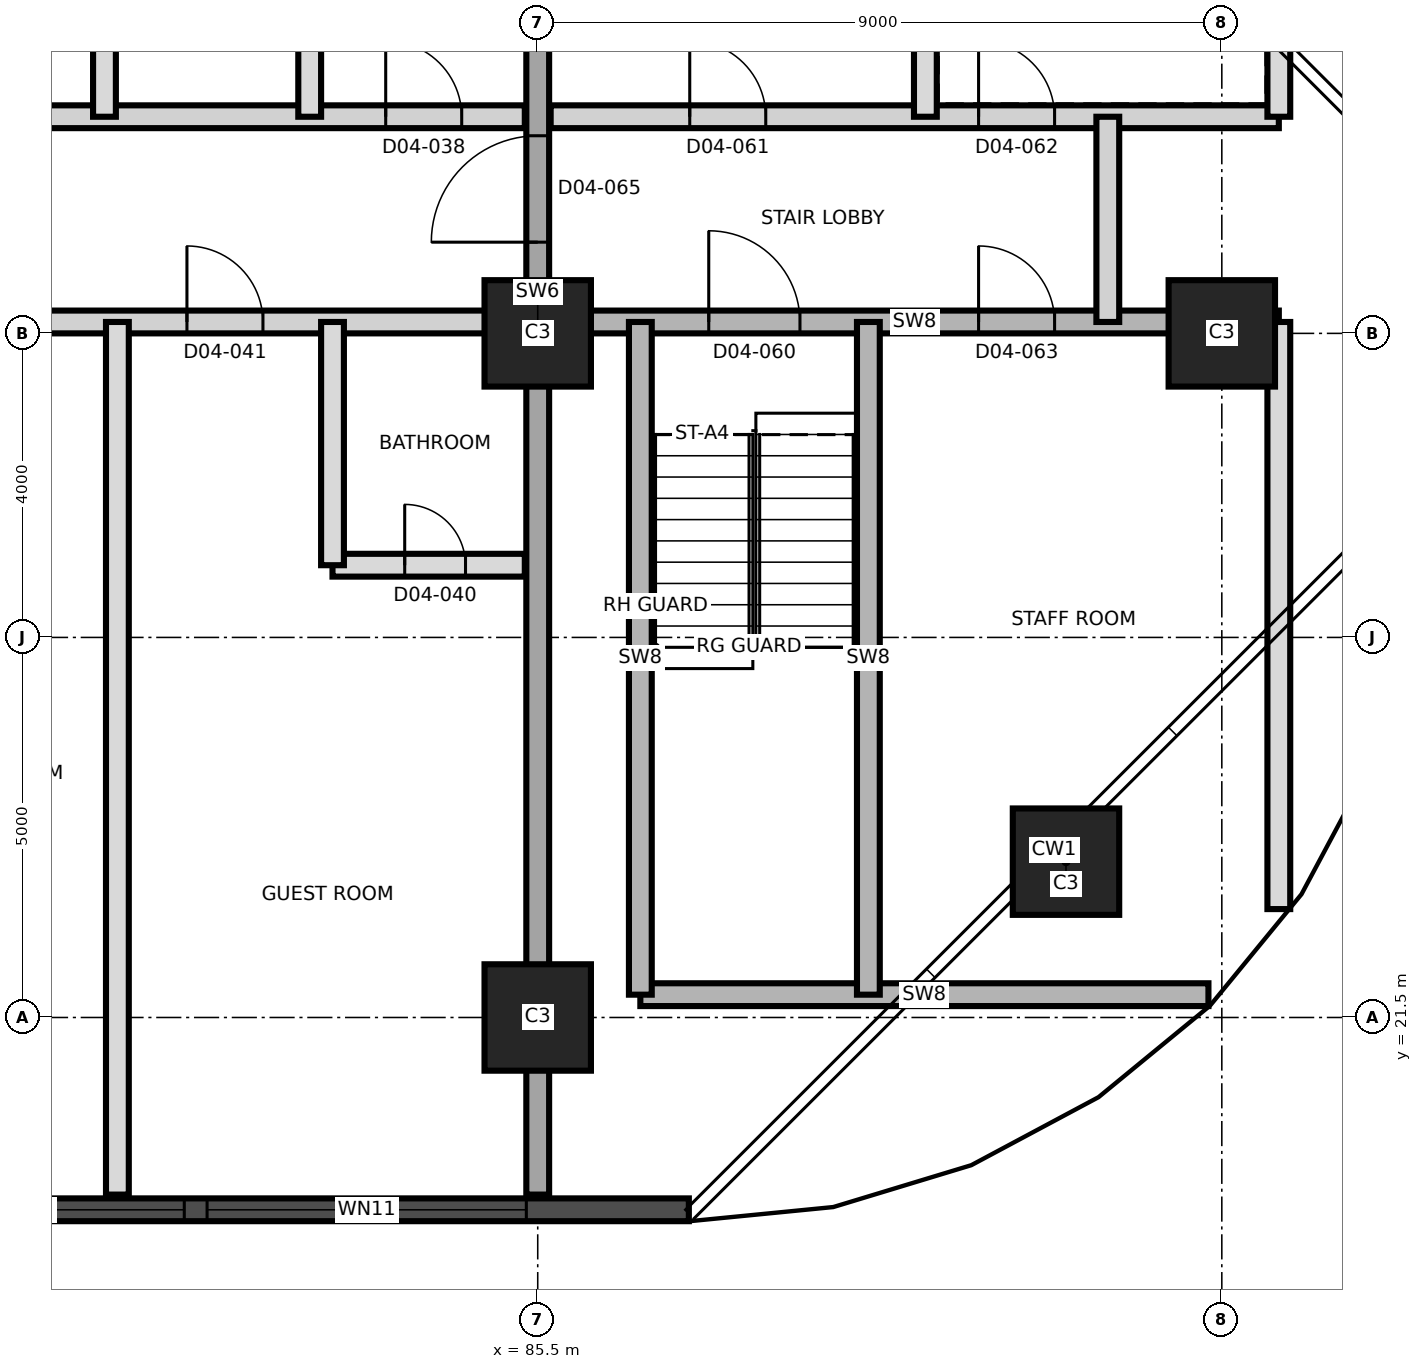
"""IFC4 building model, lengths in metres.
Left out: names, types, materials, properties, quantities, classifications, styles, units other than length and angle.
Written with IfcOpenShell. Run it as: python <this file> out.ifc"""

import sys

from ifc_helpers import new_model, si_unit, direction, frame, frame_2d, origin, origin_2d, place, context, subcontext, project, spatial, rectangle, extrude, element, fill, save


model = new_model("IFC4")
c1 = context("Model", 3, precision=1e-05, world=origin(), true_north=direction((0.0, 1.0)))
c2 = subcontext(c1, "Body", "Model", "MODEL_VIEW")
j1 = project(units=[si_unit("LENGTHUNIT", "METRE"), si_unit("PLANEANGLEUNIT", "RADIAN")], contexts=[c1])
p1 = place(None, origin())
s1 = spatial("IfcSite", under=j1, at=p1, CompositionType="ELEMENT")
p2 = place(p1, origin())
s2 = spatial("IfcBuilding", under=s1, at=p2, CompositionType="ELEMENT")
p3 = place(p2, frame((0.0, 0.0, 63.1)))
s3 = spatial("IfcBuildingStorey", under=s2, at=p3, CompositionType="ELEMENT", Elevation=63.1)
for number, where, z_axis, x_axis in (
    (1, (85.5, 21.5, 0.0), (0.0, 0.0, 1.0), (1.0, 0.0, 0.0)),
    (2, (92.45, 23.55, 0.0), (0.0, 0.0, 1.0), (1.0, 0.0, 0.0)),
    (3, (85.5, 30.5, 0.0), (0.0, 0.0, 1.0), (1.0, 0.0, 0.0)),
    (4, (94.5, 30.5, 0.0), (0.0, 0.0, 1.0), (1.0, 0.0, 0.0)),
):
    element("IfcColumn", number, at=place(p3, frame(where, z_axis=z_axis, x_axis=x_axis)), inside=s3, PredefinedType="COLUMN", context=c2, shape_type="SweptSolid", body=[
        extrude(rectangle(XDim=1.4, YDim=1.4, at=origin_2d()), origin(), (0.0, 0.0, 1.0), 3.7),
    ])
p4 = place(p3, frame((85.5, 19.17, 0.0), z_axis=(0.0, 0.0, 1.0), x_axis=(0.0, 1.0, 0.0)))
e5 = element("IfcWall", 5, at=p4, inside=s3, PredefinedType="SHEAR", context=c2, shape_type="SweptSolid", body=[
    extrude(rectangle(XDim=22.66, YDim=0.3, at=frame_2d((11.33, 0.0))), origin(), (0.0, 0.0, 1.0), 3.7),
])
p5 = place(p4, frame((12.53, 0.0, 0.0)))
e6 = element("IfcOpeningElement", 6, at=p5, cuts=e5, PredefinedType="OPENING", context=c2, shape_type="SweptSolid", body=[
    extrude(rectangle(XDim=1.4, YDim=2.1, at=frame_2d((0.7, 1.05))), frame((0.0, 0.16, 0.0), z_axis=(0.0, -1.0, 0.0), x_axis=(1.0, 0.0, 0.0)), (0.0, 0.0, 1.0), 0.32),
])
p6 = place(p3, frame((44.01, 18.97, 0.0), z_axis=(0.0, 0.0, 1.0), x_axis=(1.0, 0.0, 0.0)))
e7 = element("IfcWall", 7, at=p6, inside=s3, PredefinedType="SOLIDWALL", context=c2, shape_type="SweptSolid", body=[
    extrude(rectangle(XDim=43.478, YDim=0.3, at=frame_2d((21.739, 0.0))), origin(), (0.0, 0.0, 1.0), 3.4),
])
p7 = place(p6, frame((1.845, 0.0, 0.3)))
e8 = element("IfcOpeningElement", 8, at=p7, cuts=e7, PredefinedType="OPENING", context=c2, shape_type="SweptSolid", body=[
    extrude(rectangle(XDim=1.8, YDim=2.4, at=frame_2d((0.9, 1.2))), frame((0.0, 0.16, 0.0), z_axis=(0.0, -1.0, 0.0), x_axis=(1.0, 0.0, 0.0)), (0.0, 0.0, 1.0), 0.32),
])
p8 = place(p6, frame((5.64, 0.0, 0.9)))
e9 = element("IfcOpeningElement", 9, at=p8, cuts=e7, PredefinedType="OPENING", context=c2, shape_type="SweptSolid", body=[
    extrude(rectangle(XDim=4.2, YDim=1.5, at=frame_2d((2.1, 0.75))), frame((0.0, 0.16, 0.0), z_axis=(0.0, -1.0, 0.0), x_axis=(1.0, 0.0, 0.0)), (0.0, 0.0, 1.0), 0.32),
])
p9 = place(p6, frame((10.14, 0.0, 0.9)))
e10 = element("IfcOpeningElement", 10, at=p9, cuts=e7, PredefinedType="OPENING", context=c2, shape_type="SweptSolid", body=[
    extrude(rectangle(XDim=4.2, YDim=1.5, at=frame_2d((2.1, 0.75))), frame((0.0, 0.16, 0.0), z_axis=(0.0, -1.0, 0.0), x_axis=(1.0, 0.0, 0.0)), (0.0, 0.0, 1.0), 0.32),
])
p10 = place(p6, frame((14.64, 0.0, 0.9)))
e11 = element("IfcOpeningElement", 11, at=p10, cuts=e7, PredefinedType="OPENING", context=c2, shape_type="SweptSolid", body=[
    extrude(rectangle(XDim=4.2, YDim=1.5, at=frame_2d((2.1, 0.75))), frame((0.0, 0.16, 0.0), z_axis=(0.0, -1.0, 0.0), x_axis=(1.0, 0.0, 0.0)), (0.0, 0.0, 1.0), 0.32),
])
p11 = place(p6, frame((19.14, 0.0, 0.9)))
e12 = element("IfcOpeningElement", 12, at=p11, cuts=e7, PredefinedType="OPENING", context=c2, shape_type="SweptSolid", body=[
    extrude(rectangle(XDim=4.2, YDim=1.5, at=frame_2d((2.1, 0.75))), frame((0.0, 0.16, 0.0), z_axis=(0.0, -1.0, 0.0), x_axis=(1.0, 0.0, 0.0)), (0.0, 0.0, 1.0), 0.32),
])
p12 = place(p6, frame((23.64, 0.0, 0.9)))
e13 = element("IfcOpeningElement", 13, at=p12, cuts=e7, PredefinedType="OPENING", context=c2, shape_type="SweptSolid", body=[
    extrude(rectangle(XDim=4.2, YDim=1.5, at=frame_2d((2.1, 0.75))), frame((0.0, 0.16, 0.0), z_axis=(0.0, -1.0, 0.0), x_axis=(1.0, 0.0, 0.0)), (0.0, 0.0, 1.0), 0.32),
])
p13 = place(p6, frame((28.14, 0.0, 0.9)))
e14 = element("IfcOpeningElement", 14, at=p13, cuts=e7, PredefinedType="OPENING", context=c2, shape_type="SweptSolid", body=[
    extrude(rectangle(XDim=4.2, YDim=1.5, at=frame_2d((2.1, 0.75))), frame((0.0, 0.16, 0.0), z_axis=(0.0, -1.0, 0.0), x_axis=(1.0, 0.0, 0.0)), (0.0, 0.0, 1.0), 0.32),
])
p14 = place(p6, frame((32.64, 0.0, 0.9)))
e15 = element("IfcOpeningElement", 15, at=p14, cuts=e7, PredefinedType="OPENING", context=c2, shape_type="SweptSolid", body=[
    extrude(rectangle(XDim=4.2, YDim=1.5, at=frame_2d((2.1, 0.75))), frame((0.0, 0.16, 0.0), z_axis=(0.0, -1.0, 0.0), x_axis=(1.0, 0.0, 0.0)), (0.0, 0.0, 1.0), 0.32),
])
p15 = place(p6, frame((37.14, 0.0, 0.9)))
e16 = element("IfcOpeningElement", 16, at=p15, cuts=e7, PredefinedType="OPENING", context=c2, shape_type="SweptSolid", body=[
    extrude(rectangle(XDim=4.2, YDim=1.5, at=frame_2d((2.1, 0.75))), frame((0.0, 0.16, 0.0), z_axis=(0.0, -1.0, 0.0), x_axis=(1.0, 0.0, 0.0)), (0.0, 0.0, 1.0), 0.32),
])
p16 = place(p3, frame((86.85, 21.8, 0.0), z_axis=(0.0, 0.0, 1.0), x_axis=(1.0, 0.0, 0.0)))
e17 = element("IfcWall", 17, at=p16, inside=s3, PredefinedType="SHEAR", context=c2, shape_type="SweptSolid", body=[
    extrude(rectangle(XDim=7.474, YDim=0.3, at=frame_2d((3.737, 0.0))), origin(), (0.0, 0.0, 1.0), 3.4),
])
p17 = place(p3, frame((82.8, 27.45, 0.0), z_axis=(0.0, 0.0, 1.0), x_axis=(1.0, 0.0, 0.0)))
e18 = element("IfcWall", 18, at=p17, inside=s3, PredefinedType="PARTITIONING", context=c2, shape_type="SweptSolid", body=[
    extrude(rectangle(XDim=2.53, YDim=0.3, at=frame_2d((1.265, 0.0))), origin(), (0.0, 0.0, 1.0), 3.4),
])
p18 = place(p17, frame((0.95, 0.0, 0.0)))
e19 = element("IfcOpeningElement", 19, at=p18, cuts=e18, PredefinedType="OPENING", context=c2, shape_type="SweptSolid", body=[
    extrude(rectangle(XDim=0.8, YDim=2.1, at=frame_2d((0.4, 1.05))), frame((0.0, 0.16, 0.0), z_axis=(0.0, -1.0, 0.0), x_axis=(1.0, 0.0, 0.0)), (0.0, 0.0, 1.0), 0.32),
])
p19 = place(p3, frame((58.95, 30.65, 0.0), z_axis=(0.0, 0.0, 1.0), x_axis=(1.0, 0.0, 0.0)))
e20 = element("IfcWall", 20, at=p19, inside=s3, PredefinedType="PARTITIONING", context=c2, shape_type="SweptSolid", body=[
    extrude(rectangle(XDim=26.38, YDim=0.3, at=frame_2d((13.19, 0.0))), origin(), (0.0, 0.0, 1.0), 3.4),
])
p20 = place(p19, frame((1.25, 0.0, 0.0)))
e21 = element("IfcOpeningElement", 21, at=p20, cuts=e20, PredefinedType="OPENING", context=c2, shape_type="SweptSolid", body=[
    extrude(rectangle(XDim=1.2, YDim=2.1, at=frame_2d((0.6, 1.05))), frame((0.0, 0.16, 0.0), z_axis=(0.0, -1.0, 0.0), x_axis=(1.0, 0.0, 0.0)), (0.0, 0.0, 1.0), 0.32),
])
p21 = place(p19, frame((4.5, 0.0, 0.0)))
e22 = element("IfcOpeningElement", 22, at=p21, cuts=e20, PredefinedType="OPENING", context=c2, shape_type="SweptSolid", body=[
    extrude(rectangle(XDim=1.0, YDim=2.1, at=frame_2d((0.5, 1.05))), frame((0.0, 0.16, 0.0), z_axis=(0.0, -1.0, 0.0), x_axis=(1.0, 0.0, 0.0)), (0.0, 0.0, 1.0), 0.32),
])
p22 = place(p19, frame((14.2, 0.0, 0.0)))
e23 = element("IfcOpeningElement", 23, at=p22, cuts=e20, PredefinedType="OPENING", context=c2, shape_type="SweptSolid", body=[
    extrude(rectangle(XDim=1.0, YDim=2.4, at=frame_2d((0.5, 1.2))), frame((0.0, 0.16, 0.0), z_axis=(0.0, -1.0, 0.0), x_axis=(1.0, 0.0, 0.0)), (0.0, 0.0, 1.0), 0.32),
])
p23 = place(p19, frame((18.685, 0.0, 0.0)))
e24 = element("IfcOpeningElement", 24, at=p23, cuts=e20, PredefinedType="OPENING", context=c2, shape_type="SweptSolid", body=[
    extrude(rectangle(XDim=1.2, YDim=2.1, at=frame_2d((0.6, 1.05))), frame((0.0, 0.16, 0.0), z_axis=(0.0, -1.0, 0.0), x_axis=(1.0, 0.0, 0.0)), (0.0, 0.0, 1.0), 0.32),
])
p24 = place(p19, frame((21.935, 0.0, 0.0)))
e25 = element("IfcOpeningElement", 25, at=p24, cuts=e20, PredefinedType="OPENING", context=c2, shape_type="SweptSolid", body=[
    extrude(rectangle(XDim=1.0, YDim=2.1, at=frame_2d((0.5, 1.05))), frame((0.0, 0.16, 0.0), z_axis=(0.0, -1.0, 0.0), x_axis=(1.0, 0.0, 0.0)), (0.0, 0.0, 1.0), 0.32),
])
p25 = place(p3, frame((85.67, 30.65, 0.0), z_axis=(0.0, 0.0, 1.0), x_axis=(1.0, 0.0, 0.0)))
e26 = element("IfcWall", 26, at=p25, inside=s3, PredefinedType="SHEAR", context=c2, shape_type="SweptSolid", body=[
    extrude(rectangle(XDim=9.58, YDim=0.3, at=frame_2d((4.79, 0.0))), origin(), (0.0, 0.0, 1.0), 3.4),
])
p26 = place(p25, frame((2.08, 0.0, 0.0)))
e27 = element("IfcOpeningElement", 27, at=p26, cuts=e26, PredefinedType="OPENING", context=c2, shape_type="SweptSolid", body=[
    extrude(rectangle(XDim=1.2, YDim=2.1, at=frame_2d((0.6, 1.05))), frame((0.0, 0.16, 0.0), z_axis=(0.0, -1.0, 0.0), x_axis=(1.0, 0.0, 0.0)), (0.0, 0.0, 1.0), 0.32),
])
p27 = place(p25, frame((5.63, 0.0, 0.0)))
e28 = element("IfcOpeningElement", 28, at=p27, cuts=e26, PredefinedType="OPENING", context=c2, shape_type="SweptSolid", body=[
    extrude(rectangle(XDim=1.0, YDim=2.1, at=frame_2d((0.5, 1.05))), frame((0.0, 0.16, 0.0), z_axis=(0.0, -1.0, 0.0), x_axis=(1.0, 0.0, 0.0)), (0.0, 0.0, 1.0), 0.32),
])
p28 = place(p3, frame((58.95, 33.35, 0.0), z_axis=(0.0, 0.0, 1.0), x_axis=(1.0, 0.0, 0.0)))
e29 = element("IfcWall", 29, at=p28, inside=s3, PredefinedType="PARTITIONING", context=c2, shape_type="SweptSolid", body=[
    extrude(rectangle(XDim=26.38, YDim=0.3, at=frame_2d((13.19, 0.0))), origin(), (0.0, 0.0, 1.0), 3.4),
])
p29 = place(p28, frame((1.9, 0.0, 0.0)))
e30 = element("IfcOpeningElement", 30, at=p29, cuts=e29, PredefinedType="OPENING", context=c2, shape_type="SweptSolid", body=[
    extrude(rectangle(XDim=1.0, YDim=2.4, at=frame_2d((0.5, 1.2))), frame((0.0, 0.16, 0.0), z_axis=(0.0, -1.0, 0.0), x_axis=(1.0, 0.0, 0.0)), (0.0, 0.0, 1.0), 0.32),
])
p30 = place(p28, frame((9.685, 0.0, 0.0)))
e31 = element("IfcOpeningElement", 31, at=p30, cuts=e29, PredefinedType="OPENING", context=c2, shape_type="SweptSolid", body=[
    extrude(rectangle(XDim=1.2, YDim=2.1, at=frame_2d((0.6, 1.05))), frame((0.0, 0.16, 0.0), z_axis=(0.0, -1.0, 0.0), x_axis=(1.0, 0.0, 0.0)), (0.0, 0.0, 1.0), 0.32),
])
p31 = place(p28, frame((12.935, 0.0, 0.0)))
e32 = element("IfcOpeningElement", 32, at=p31, cuts=e29, PredefinedType="OPENING", context=c2, shape_type="SweptSolid", body=[
    extrude(rectangle(XDim=1.0, YDim=2.1, at=frame_2d((0.5, 1.05))), frame((0.0, 0.16, 0.0), z_axis=(0.0, -1.0, 0.0), x_axis=(1.0, 0.0, 0.0)), (0.0, 0.0, 1.0), 0.32),
])
p32 = place(p28, frame((18.7, 0.0, 0.0)))
e33 = element("IfcOpeningElement", 33, at=p32, cuts=e29, PredefinedType="OPENING", context=c2, shape_type="SweptSolid", body=[
    extrude(rectangle(XDim=1.0, YDim=2.1, at=frame_2d((0.5, 1.05))), frame((0.0, 0.16, 0.0), z_axis=(0.0, -1.0, 0.0), x_axis=(1.0, 0.0, 0.0)), (0.0, 0.0, 1.0), 0.32),
])
p33 = place(p28, frame((24.55, 0.0, 0.0)))
e34 = element("IfcOpeningElement", 34, at=p33, cuts=e29, PredefinedType="OPENING", context=c2, shape_type="SweptSolid", body=[
    extrude(rectangle(XDim=1.0, YDim=2.1, at=frame_2d((0.5, 1.05))), frame((0.0, 0.16, 0.0), z_axis=(0.0, -1.0, 0.0), x_axis=(1.0, 0.0, 0.0)), (0.0, 0.0, 1.0), 0.32),
])
p34 = place(p3, frame((85.67, 33.35, 0.0), z_axis=(0.0, 0.0, 1.0), x_axis=(1.0, 0.0, 0.0)))
e35 = element("IfcWall", 35, at=p34, inside=s3, PredefinedType="PARTITIONING", context=c2, shape_type="SweptSolid", body=[
    extrude(rectangle(XDim=9.58, YDim=0.3, at=frame_2d((4.79, 0.0))), origin(), (0.0, 0.0, 1.0), 3.4),
])
p35 = place(p34, frame((1.83, 0.0, 0.0)))
e36 = element("IfcOpeningElement", 36, at=p35, cuts=e35, PredefinedType="OPENING", context=c2, shape_type="SweptSolid", body=[
    extrude(rectangle(XDim=1.0, YDim=2.1, at=frame_2d((0.5, 1.05))), frame((0.0, 0.16, 0.0), z_axis=(0.0, -1.0, 0.0), x_axis=(1.0, 0.0, 0.0)), (0.0, 0.0, 1.0), 0.32),
])
p36 = place(p34, frame((5.63, 0.0, 0.0)))
e37 = element("IfcOpeningElement", 37, at=p36, cuts=e35, PredefinedType="OPENING", context=c2, shape_type="SweptSolid", body=[
    extrude(rectangle(XDim=1.0, YDim=2.1, at=frame_2d((0.5, 1.05))), frame((0.0, 0.16, 0.0), z_axis=(0.0, -1.0, 0.0), x_axis=(1.0, 0.0, 0.0)), (0.0, 0.0, 1.0), 0.32),
])
p37 = place(p3, frame((79.8, 33.35, 0.0), z_axis=(0.0, 0.0, 1.0), x_axis=(0.0, 1.0, 0.0)))
e38 = element("IfcWall", 38, at=p37, inside=s3, PredefinedType="PARTITIONING", context=c2, shape_type="SweptSolid", body=[
    extrude(rectangle(XDim=3.2, YDim=0.3, at=frame_2d((1.6, 0.0))), origin(), (0.0, 0.0, 1.0), 3.4),
])
p38 = place(p3, frame((79.97, 19.17, 0.0), z_axis=(0.0, 0.0, 1.0), x_axis=(0.0, 1.0, 0.0)))
e39 = element("IfcWall", 39, at=p38, inside=s3, PredefinedType="PARTITIONING", context=c2, shape_type="SweptSolid", body=[
    extrude(rectangle(XDim=11.48, YDim=0.3, at=frame_2d((5.74, 0.0))), origin(), (0.0, 0.0, 1.0), 3.4),
])
p39 = place(p3, frame((82.5, 33.35, 0.0), z_axis=(0.0, 0.0, 1.0), x_axis=(0.0, 1.0, 0.0)))
e40 = element("IfcWall", 40, at=p39, inside=s3, PredefinedType="PARTITIONING", context=c2, shape_type="SweptSolid", body=[
    extrude(rectangle(XDim=8.66, YDim=0.3, at=frame_2d((4.33, 0.0))), origin(), (0.0, 0.0, 1.0), 3.4),
])
p40 = place(p3, frame((82.8, 27.45, 0.0), z_axis=(0.0, 0.0, 1.0), x_axis=(0.0, 1.0, 0.0)))
e41 = element("IfcWall", 41, at=p40, inside=s3, PredefinedType="PARTITIONING", context=c2, shape_type="SweptSolid", body=[
    extrude(rectangle(XDim=3.2, YDim=0.3, at=frame_2d((1.6, 0.0))), origin(), (0.0, 0.0, 1.0), 3.4),
])
for number, where, z_axis, x_axis in (
    (42, (86.85, 21.8, 0.0), (0.0, 0.0, 1.0), (0.0, 1.0, 0.0)),
    (43, (89.85, 21.8, 0.0), (0.0, 0.0, 1.0), (0.0, 1.0, 0.0)),
):
    element("IfcWall", number, at=place(p3, frame(where, z_axis=z_axis, x_axis=x_axis)), inside=s3, PredefinedType="SHEAR", context=c2, shape_type="SweptSolid", body=[
        extrude(rectangle(XDim=8.85, YDim=0.3, at=frame_2d((4.425, 0.0))), origin(), (0.0, 0.0, 1.0), 3.4),
    ])
p41 = place(p3, frame((90.6, 33.35, 0.0), z_axis=(0.0, 0.0, 1.0), x_axis=(0.0, 1.0, 0.0)))
e44 = element("IfcWall", 44, at=p41, inside=s3, PredefinedType="PARTITIONING", context=c2, shape_type="SweptSolid", body=[
    extrude(rectangle(XDim=7.5, YDim=0.3, at=frame_2d((3.75, 0.0))), origin(), (0.0, 0.0, 1.0), 3.4),
])
p42 = place(p3, frame((93.0, 30.65, 0.0), z_axis=(0.0, 0.0, 1.0), x_axis=(0.0, 1.0, 0.0)))
e45 = element("IfcWall", 45, at=p42, inside=s3, PredefinedType="PARTITIONING", context=c2, shape_type="SweptSolid", body=[
    extrude(rectangle(XDim=2.7, YDim=0.3, at=frame_2d((1.35, 0.0))), origin(), (0.0, 0.0, 1.0), 3.4),
])
p43 = place(p3, frame((95.25, 22.926, 0.0), z_axis=(0.0, 0.0, 1.0), x_axis=(0.0, 1.0, 0.0)))
e46 = element("IfcWall", 46, at=p43, inside=s3, PredefinedType="PARTITIONING", context=c2, shape_type="SweptSolid", body=[
    extrude(rectangle(XDim=7.724, YDim=0.3, at=frame_2d((3.862, 0.0))), origin(), (0.0, 0.0, 1.0), 3.4),
])
p44 = place(p3, frame((95.25, 33.35, 0.0), z_axis=(0.0, 0.0, 1.0), x_axis=(0.0, 1.0, 0.0)))
e47 = element("IfcWall", 47, at=p44, inside=s3, PredefinedType="PARTITIONING", context=c2, shape_type="SweptSolid", body=[
    extrude(rectangle(XDim=4.724, YDim=0.3, at=frame_2d((2.362, 0.0))), origin(), (0.0, 0.0, 1.0), 3.4),
])
p45 = place(p14, origin())
e48 = element("IfcWindow", 48, at=p45, inside=s3, PartitioningType="SINGLE_PANEL", PredefinedType="WINDOW", context=c2, shape_type="SweptSolid", body=[
    extrude(rectangle(XDim=4.2, YDim=1.5, at=frame_2d((2.1, 0.75))), frame((0.0, 0.03, 0.0), z_axis=(0.0, -1.0, 0.0), x_axis=(1.0, 0.0, 0.0)), (0.0, 0.0, 1.0), 0.06),
])
fill(e15, e48)
p46 = place(p15, origin())
e49 = element("IfcWindow", 49, at=p46, inside=s3, PartitioningType="SINGLE_PANEL", PredefinedType="WINDOW", context=c2, shape_type="SweptSolid", body=[
    extrude(rectangle(XDim=4.2, YDim=1.5, at=frame_2d((2.1, 0.75))), frame((0.0, 0.03, 0.0), z_axis=(0.0, -1.0, 0.0), x_axis=(1.0, 0.0, 0.0)), (0.0, 0.0, 1.0), 0.06),
])
fill(e16, e49)
p47 = place(p33, origin())
e50 = element("IfcDoor", 50, at=p47, inside=s3, OperationType="SINGLE_SWING_LEFT", PredefinedType="DOOR", context=c2, shape_type="SweptSolid", body=[
    extrude(rectangle(XDim=1.0, YDim=2.1, at=frame_2d((0.5, 1.05))), frame((0.0, 0.025, 0.0), z_axis=(0.0, -1.0, 0.0), x_axis=(1.0, 0.0, 0.0)), (0.0, 0.0, 1.0), 0.05),
])
fill(e34, e50)
p48 = place(p18, origin())
e51 = element("IfcDoor", 51, at=p48, inside=s3, OperationType="SINGLE_SWING_LEFT", PredefinedType="DOOR", context=c2, shape_type="SweptSolid", body=[
    extrude(rectangle(XDim=0.8, YDim=2.1, at=frame_2d((0.4, 1.05))), frame((0.0, 0.025, 0.0), z_axis=(0.0, -1.0, 0.0), x_axis=(1.0, 0.0, 0.0)), (0.0, 0.0, 1.0), 0.05),
])
fill(e19, e51)
p49 = place(p24, origin())
e52 = element("IfcDoor", 52, at=p49, inside=s3, OperationType="SINGLE_SWING_RIGHT", PredefinedType="DOOR", context=c2, shape_type="SweptSolid", body=[
    extrude(rectangle(XDim=1.0, YDim=2.1, at=frame_2d((0.5, 1.05))), frame((0.0, 0.025, 0.0), z_axis=(0.0, -1.0, 0.0), x_axis=(1.0, 0.0, 0.0)), (0.0, 0.0, 1.0), 0.05),
])
fill(e25, e52)
p50 = place(p26, origin())
e53 = element("IfcDoor", 53, at=p50, inside=s3, OperationType="SINGLE_SWING_LEFT", PredefinedType="DOOR", context=c2, shape_type="SweptSolid", body=[
    extrude(rectangle(XDim=1.2, YDim=2.1, at=frame_2d((0.6, 1.05))), frame((0.0, 0.025, 0.0), z_axis=(0.0, -1.0, 0.0), x_axis=(1.0, 0.0, 0.0)), (0.0, 0.0, 1.0), 0.05),
])
fill(e27, e53)
p51 = place(p35, origin())
e54 = element("IfcDoor", 54, at=p51, inside=s3, OperationType="SINGLE_SWING_LEFT", PredefinedType="DOOR", context=c2, shape_type="SweptSolid", body=[
    extrude(rectangle(XDim=1.0, YDim=2.1, at=frame_2d((0.5, 1.05))), frame((0.0, 0.025, 0.0), z_axis=(0.0, -1.0, 0.0), x_axis=(1.0, 0.0, 0.0)), (0.0, 0.0, 1.0), 0.05),
])
fill(e36, e54)
p52 = place(p36, origin())
e55 = element("IfcDoor", 55, at=p52, inside=s3, OperationType="SINGLE_SWING_RIGHT", PredefinedType="DOOR", context=c2, shape_type="SweptSolid", body=[
    extrude(rectangle(XDim=1.0, YDim=2.1, at=frame_2d((0.5, 1.05))), frame((0.0, 0.025, 0.0), z_axis=(0.0, -1.0, 0.0), x_axis=(1.0, 0.0, 0.0)), (0.0, 0.0, 1.0), 0.05),
])
fill(e37, e55)
p53 = place(p27, origin())
e56 = element("IfcDoor", 56, at=p53, inside=s3, OperationType="SINGLE_SWING_LEFT", PredefinedType="DOOR", context=c2, shape_type="SweptSolid", body=[
    extrude(rectangle(XDim=1.0, YDim=2.1, at=frame_2d((0.5, 1.05))), frame((0.0, 0.025, 0.0), z_axis=(0.0, -1.0, 0.0), x_axis=(1.0, 0.0, 0.0)), (0.0, 0.0, 1.0), 0.05),
])
fill(e28, e56)
p54 = place(p5, origin())
e57 = element("IfcDoor", 57, at=p54, inside=s3, OperationType="SINGLE_SWING_RIGHT", PredefinedType="DOOR", context=c2, shape_type="SweptSolid", body=[
    extrude(rectangle(XDim=1.4, YDim=2.1, at=frame_2d((0.7, 1.05))), frame((0.0, 0.025, 0.0), z_axis=(0.0, -1.0, 0.0), x_axis=(1.0, 0.0, 0.0)), (0.0, 0.0, 1.0), 0.05),
])
fill(e6, e57)
save(model, sys.argv[1])
